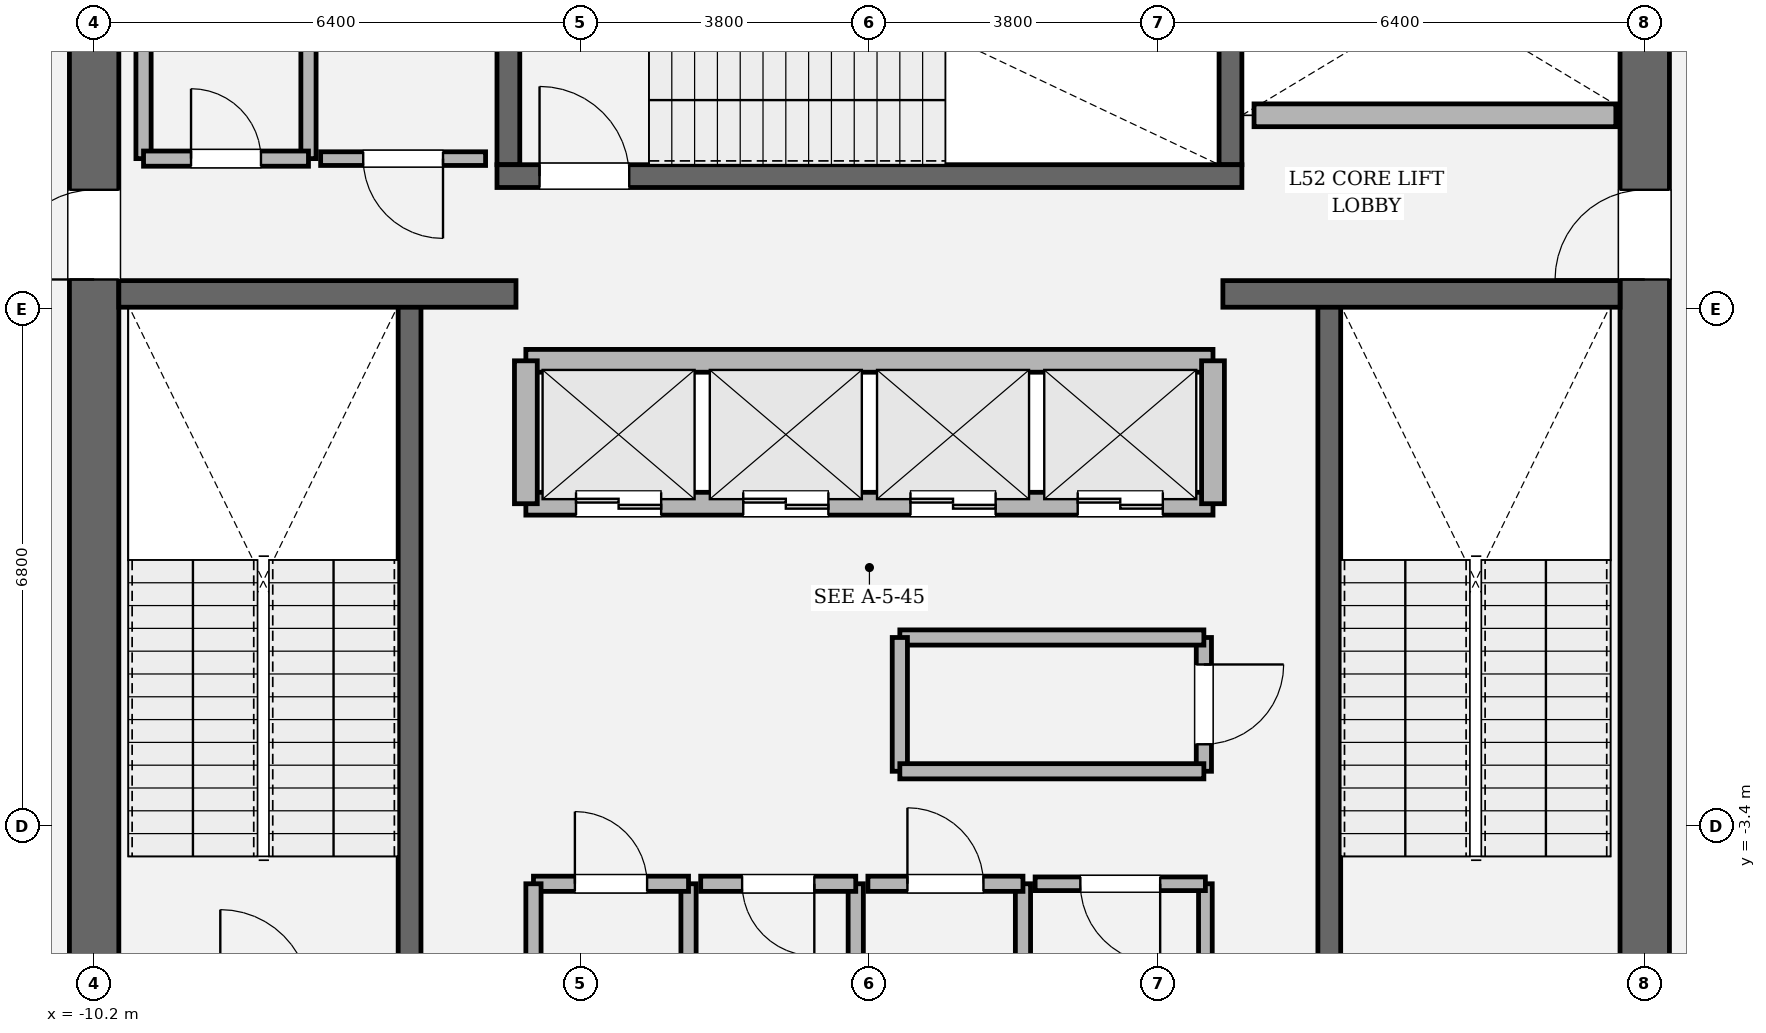
"""IFC4 building model, lengths in metres.
Left out: names, types, materials, properties, quantities, classifications, styles, units other than length and angle.
Written with IfcOpenShell. Run it as: python <this file> out.ifc"""

import sys

from ifc_helpers import new_model, si_unit, direction, frame, frame_2d, origin, place, context, subcontext, project, spatial, rectangle, extrude, element, fill, save


model = new_model("IFC4")
c1 = context("Model", 3, precision=1e-05, world=origin(), true_north=direction((0.0, 1.0)))
c2 = subcontext(c1, "Body", "Model", "MODEL_VIEW")
j1 = project(units=[si_unit("LENGTHUNIT", "METRE"), si_unit("PLANEANGLEUNIT", "RADIAN")], contexts=[c1])
p1 = place(None, origin())
s1 = spatial("IfcSite", under=j1, at=p1, CompositionType="ELEMENT")
p2 = place(p1, origin())
s2 = spatial("IfcBuilding", under=s1, at=p2, CompositionType="ELEMENT")
p3 = place(p2, frame((0.0, 0.0, 220.8)))
s3 = spatial("IfcBuildingStorey", under=s2, at=p3, CompositionType="ELEMENT", Elevation=220.8)
p4 = place(p3, frame((-10.2, -8.875, 0.0), z_axis=(0.0, 0.0, 1.0), x_axis=(0.0, 1.0, 0.0)))
e1 = element("IfcWall", 1, at=p4, inside=s3, PredefinedType="SHEAR", context=c2, shape_type="SweptSolid", body=[
    extrude(rectangle(XDim=17.75, YDim=0.65, at=frame_2d((8.875, 0.0))), origin(), (0.0, 0.0, 1.0), 4.05),
])
p5 = place(p4, frame((12.665, 0.0, 0.0)))
e2 = element("IfcOpeningElement", 2, at=p5, cuts=e1, PredefinedType="OPENING", context=c2, shape_type="SweptSolid", body=[
    extrude(rectangle(XDim=1.18, YDim=2.2, at=frame_2d((0.59, 1.1))), frame((0.0, 0.335, 0.0), z_axis=(0.0, -1.0, 0.0), x_axis=(1.0, 0.0, 0.0)), (0.0, 0.0, 1.0), 0.67),
])
p6 = place(p3, frame((10.2, 8.875, 0.0), z_axis=(0.0, 0.0, 1.0), x_axis=(0.0, -1.0, 0.0)))
e3 = element("IfcWall", 3, at=p6, inside=s3, PredefinedType="SHEAR", context=c2, shape_type="SweptSolid", body=[
    extrude(rectangle(XDim=17.75, YDim=0.65, at=frame_2d((8.875, 0.0))), origin(), (0.0, 0.0, 1.0), 4.05),
])
p7 = place(p6, frame((3.905, 0.0, 0.0)))
e4 = element("IfcOpeningElement", 4, at=p7, cuts=e3, PredefinedType="OPENING", context=c2, shape_type="SweptSolid", body=[
    extrude(rectangle(XDim=1.18, YDim=2.2, at=frame_2d((0.59, 1.1))), frame((0.0, 0.335, 0.0), z_axis=(0.0, -1.0, 0.0), x_axis=(1.0, 0.0, 0.0)), (0.0, 0.0, 1.0), 0.67),
])
for number, where, z_axis, x_axis in (
    (5, (-6.05, -5.5, 0.0), (0.0, 0.0, 1.0), (0.0, 1.0, 0.0)),
    (6, (6.05, 3.45, 0.0), (0.0, 0.0, 1.0), (0.0, -1.0, 0.0)),
):
    element("IfcWall", number, at=place(p3, frame(where, z_axis=z_axis, x_axis=x_axis)), inside=s3, PredefinedType="SOLIDWALL", context=c2, shape_type="SweptSolid", body=[
        extrude(rectangle(XDim=8.95, YDim=0.3, at=frame_2d((4.475, 0.0))), origin(), (0.0, 0.0, 1.0), 4.05),
    ])
for number, where, z_axis, x_axis in (
    (7, (-4.75, 5.3, 0.0), (0.0, 0.0, 1.0), (0.0, 1.0, 0.0)),
    (8, (4.75, 8.875, 0.0), (0.0, 0.0, 1.0), (0.0, -1.0, 0.0)),
):
    element("IfcWall", number, at=place(p3, frame(where, z_axis=z_axis, x_axis=x_axis)), inside=s3, PredefinedType="SOLIDWALL", context=c2, shape_type="SweptSolid", body=[
        extrude(rectangle(XDim=3.575, YDim=0.3, at=frame_2d((1.788, 0.0))), origin(), (0.0, 0.0, 1.0), 4.05),
    ])
p8 = place(p3, frame((-4.9, 5.15, 0.0), z_axis=(0.0, 0.0, 1.0), x_axis=(1.0, 0.0, 0.0)))
e9 = element("IfcWall", 9, at=p8, inside=s3, PredefinedType="SOLIDWALL", context=c2, shape_type="SweptSolid", body=[
    extrude(rectangle(XDim=9.8, YDim=0.3, at=frame_2d((4.9, 0.0))), origin(), (0.0, 0.0, 1.0), 4.05),
])
p9 = place(p8, frame((0.56, 0.0, 0.0)))
e10 = element("IfcOpeningElement", 10, at=p9, cuts=e9, PredefinedType="OPENING", context=c2, shape_type="SweptSolid", body=[
    extrude(rectangle(XDim=1.18, YDim=2.2, at=frame_2d((0.59, 1.1))), frame((0.0, 0.16, 0.0), z_axis=(0.0, -1.0, 0.0), x_axis=(1.0, 0.0, 0.0)), (0.0, 0.0, 1.0), 0.32),
])
for number, where, z_axis, x_axis in (
    (11, (-9.875, 3.6, 0.0), (0.0, 0.0, 1.0), (1.0, 0.0, 0.0)),
    (12, (4.65, 3.6, 0.0), (0.0, 0.0, 1.0), (1.0, 0.0, 0.0)),
):
    element("IfcWall", number, at=place(p3, frame(where, z_axis=z_axis, x_axis=x_axis)), inside=s3, PredefinedType="SOLIDWALL", context=c2, shape_type="SweptSolid", body=[
        extrude(rectangle(XDim=5.225, YDim=0.35, at=frame_2d((2.613, 0.0))), origin(), (0.0, 0.0, 1.0), 4.05),
    ])
p10 = place(p3, frame((-4.52, 0.84, 0.0), z_axis=(0.0, 0.0, 1.0), x_axis=(1.0, 0.0, 0.0)))
e13 = element("IfcWall", 13, at=p10, inside=s3, PredefinedType="SOLIDWALL", context=c2, shape_type="SweptSolid", body=[
    extrude(rectangle(XDim=9.04, YDim=0.3, at=frame_2d((4.52, 0.0))), origin(), (0.0, 0.0, 1.0), 3.83),
])
p11 = place(p10, frame((0.66, 0.0, 0.0)))
e14 = element("IfcOpeningElement", 14, at=p11, cuts=e13, PredefinedType="OPENING", context=c2, shape_type="SweptSolid", body=[
    extrude(rectangle(XDim=1.12, YDim=2.25, at=frame_2d((0.56, 1.125))), frame((0.0, 0.16, 0.0), z_axis=(0.0, -1.0, 0.0), x_axis=(1.0, 0.0, 0.0)), (0.0, 0.0, 1.0), 0.32),
])
p12 = place(p10, frame((2.86, 0.0, 0.0)))
e15 = element("IfcOpeningElement", 15, at=p12, cuts=e13, PredefinedType="OPENING", context=c2, shape_type="SweptSolid", body=[
    extrude(rectangle(XDim=1.12, YDim=2.25, at=frame_2d((0.56, 1.125))), frame((0.0, 0.16, 0.0), z_axis=(0.0, -1.0, 0.0), x_axis=(1.0, 0.0, 0.0)), (0.0, 0.0, 1.0), 0.32),
])
p13 = place(p10, frame((5.06, 0.0, 0.0)))
e16 = element("IfcOpeningElement", 16, at=p13, cuts=e13, PredefinedType="OPENING", context=c2, shape_type="SweptSolid", body=[
    extrude(rectangle(XDim=1.12, YDim=2.25, at=frame_2d((0.56, 1.125))), frame((0.0, 0.16, 0.0), z_axis=(0.0, -1.0, 0.0), x_axis=(1.0, 0.0, 0.0)), (0.0, 0.0, 1.0), 0.32),
])
p14 = place(p10, frame((7.26, 0.0, 0.0)))
e17 = element("IfcOpeningElement", 17, at=p14, cuts=e13, PredefinedType="OPENING", context=c2, shape_type="SweptSolid", body=[
    extrude(rectangle(XDim=1.12, YDim=2.25, at=frame_2d((0.56, 1.125))), frame((0.0, 0.16, 0.0), z_axis=(0.0, -1.0, 0.0), x_axis=(1.0, 0.0, 0.0)), (0.0, 0.0, 1.0), 0.32),
])
p15 = place(p3, frame((-4.52, 2.72, 0.0), z_axis=(0.0, 0.0, 1.0), x_axis=(1.0, 0.0, 0.0)))
e18 = element("IfcWall", 18, at=p15, inside=s3, PredefinedType="SOLIDWALL", context=c2, shape_type="SweptSolid", body=[
    extrude(rectangle(XDim=9.04, YDim=0.3, at=frame_2d((4.52, 0.0))), origin(), (0.0, 0.0, 1.0), 3.83),
])
for number, where, z_axis, x_axis in (
    (19, (-4.52, 0.84, 0.0), (0.0, 0.0, 1.0), (0.0, 1.0, 0.0)),
    (20, (4.52, 0.84, 0.0), (0.0, 0.0, 1.0), (0.0, 1.0, 0.0)),
):
    element("IfcWall", number, at=place(p3, frame(where, z_axis=z_axis, x_axis=x_axis)), inside=s3, PredefinedType="SOLIDWALL", context=c2, shape_type="SweptSolid", body=[
        extrude(rectangle(XDim=1.88, YDim=0.3, at=frame_2d((0.94, 0.0))), origin(), (0.0, 0.0, 1.0), 3.83),
    ])
p16 = place(p3, frame((5.06, 5.95, 0.0), z_axis=(0.0, 0.0, 1.0), x_axis=(1.0, 0.0, 0.0)))
e21 = element("IfcWall", 21, at=p16, inside=s3, PredefinedType="SOLIDWALL", context=c2, shape_type="SweptSolid", body=[
    extrude(rectangle(XDim=4.76, YDim=0.3, at=frame_2d((2.38, 0.0))), origin(), (0.0, 0.0, 1.0), 3.83),
])
p17 = place(p3, frame((-2.38, -5.9, 0.0), z_axis=(0.0, 0.0, 1.0), x_axis=(0.0, 1.0, 0.0)))
e22 = element("IfcWall", 22, at=p17, inside=s3, PredefinedType="SOLIDWALL", context=c2, shape_type="SweptSolid", body=[
    extrude(rectangle(XDim=1.74, YDim=0.2, at=frame_2d((0.87, 0.0))), origin(), (0.0, 0.0, 1.0), 3.83),
])
p18 = place(p3, frame((-2.38, -4.16, 0.0), z_axis=(0.0, 0.0, 1.0), x_axis=(-1.0, 0.0, 0.0)))
e23 = element("IfcWall", 23, at=p18, inside=s3, PredefinedType="SOLIDWALL", context=c2, shape_type="SweptSolid", body=[
    extrude(rectangle(XDim=2.04, YDim=0.2, at=frame_2d((1.02, 0.0))), origin(), (0.0, 0.0, 1.0), 3.83),
])
p19 = place(p18, frame((0.545, 0.0, 0.0)))
e24 = element("IfcOpeningElement", 24, at=p19, cuts=e23, PredefinedType="OPENING", context=c2, shape_type="SweptSolid", body=[
    extrude(rectangle(XDim=0.95, YDim=2.15, at=frame_2d((0.475, 1.075))), frame((0.0, 0.11, 0.0), z_axis=(0.0, -1.0, 0.0), x_axis=(1.0, 0.0, 0.0)), (0.0, 0.0, 1.0), 0.22),
])
for number, where, z_axis, x_axis in (
    (25, (-4.42, -4.16, 0.0), (0.0, 0.0, 1.0), (0.0, -1.0, 0.0)),
    (26, (-0.18, -5.9, 0.0), (0.0, 0.0, 1.0), (0.0, 1.0, 0.0)),
):
    element("IfcWall", number, at=place(p3, frame(where, z_axis=z_axis, x_axis=x_axis)), inside=s3, PredefinedType="SOLIDWALL", context=c2, shape_type="SweptSolid", body=[
        extrude(rectangle(XDim=1.74, YDim=0.2, at=frame_2d((0.87, 0.0))), origin(), (0.0, 0.0, 1.0), 3.83),
    ])
p20 = place(p3, frame((-0.18, -4.16, 0.0), z_axis=(0.0, 0.0, 1.0), x_axis=(-1.0, 0.0, 0.0)))
e27 = element("IfcWall", 27, at=p20, inside=s3, PredefinedType="SOLIDWALL", context=c2, shape_type="SweptSolid", body=[
    extrude(rectangle(XDim=2.04, YDim=0.2, at=frame_2d((1.02, 0.0))), origin(), (0.0, 0.0, 1.0), 3.83),
])
p21 = place(p20, frame((0.545, 0.0, 0.0)))
e28 = element("IfcOpeningElement", 28, at=p21, cuts=e27, PredefinedType="OPENING", context=c2, shape_type="SweptSolid", body=[
    extrude(rectangle(XDim=0.95, YDim=2.15, at=frame_2d((0.475, 1.075))), frame((0.0, 0.11, 0.0), z_axis=(0.0, -1.0, 0.0), x_axis=(1.0, 0.0, 0.0)), (0.0, 0.0, 1.0), 0.22),
])
p22 = place(p3, frame((2.02, -5.9, 0.0), z_axis=(0.0, 0.0, 1.0), x_axis=(0.0, 1.0, 0.0)))
e29 = element("IfcWall", 29, at=p22, inside=s3, PredefinedType="SOLIDWALL", context=c2, shape_type="SweptSolid", body=[
    extrude(rectangle(XDim=1.74, YDim=0.2, at=frame_2d((0.87, 0.0))), origin(), (0.0, 0.0, 1.0), 3.83),
])
p23 = place(p3, frame((2.02, -4.16, 0.0), z_axis=(0.0, 0.0, 1.0), x_axis=(-1.0, 0.0, 0.0)))
e30 = element("IfcWall", 30, at=p23, inside=s3, PredefinedType="SOLIDWALL", context=c2, shape_type="SweptSolid", body=[
    extrude(rectangle(XDim=2.04, YDim=0.2, at=frame_2d((1.02, 0.0))), origin(), (0.0, 0.0, 1.0), 3.83),
])
p24 = place(p23, frame((0.52, 0.0, 0.0)))
e31 = element("IfcOpeningElement", 31, at=p24, cuts=e30, PredefinedType="OPENING", context=c2, shape_type="SweptSolid", body=[
    extrude(rectangle(XDim=1.0, YDim=2.15, at=frame_2d((0.5, 1.075))), frame((0.0, 0.11, 0.0), z_axis=(0.0, -1.0, 0.0), x_axis=(1.0, 0.0, 0.0)), (0.0, 0.0, 1.0), 0.22),
])
p25 = place(p3, frame((4.42, -5.9, 0.0), z_axis=(0.0, 0.0, 1.0), x_axis=(0.0, 1.0, 0.0)))
e32 = element("IfcWall", 32, at=p25, inside=s3, PredefinedType="PARTITIONING", context=c2, shape_type="SweptSolid", body=[
    extrude(rectangle(XDim=1.74, YDim=0.18, at=frame_2d((0.87, 0.0))), origin(), (0.0, 0.0, 1.0), 3.83),
])
p26 = place(p3, frame((4.42, -4.16, 0.0), z_axis=(0.0, 0.0, 1.0), x_axis=(-1.0, 0.0, 0.0)))
e33 = element("IfcWall", 33, at=p26, inside=s3, PredefinedType="PARTITIONING", context=c2, shape_type="SweptSolid", body=[
    extrude(rectangle(XDim=2.24, YDim=0.18, at=frame_2d((1.12, 0.0))), origin(), (0.0, 0.0, 1.0), 3.83),
])
p27 = place(p26, frame((0.595, 0.0, 0.0)))
e34 = element("IfcOpeningElement", 34, at=p27, cuts=e33, PredefinedType="OPENING", context=c2, shape_type="SweptSolid", body=[
    extrude(rectangle(XDim=1.05, YDim=2.2, at=frame_2d((0.525, 1.1))), frame((0.0, 0.1, 0.0), z_axis=(0.0, -1.0, 0.0), x_axis=(1.0, 0.0, 0.0)), (0.0, 0.0, 1.0), 0.2),
])
p28 = place(p3, frame((4.4, -2.68, 0.0), z_axis=(0.0, 0.0, 1.0), x_axis=(0.0, 1.0, 0.0)))
e35 = element("IfcWall", 35, at=p28, inside=s3, PredefinedType="SOLIDWALL", context=c2, shape_type="SweptSolid", body=[
    extrude(rectangle(XDim=1.76, YDim=0.2, at=frame_2d((0.88, 0.0))), origin(), (0.0, 0.0, 1.0), 3.83),
])
p29 = place(p28, frame((0.355, 0.0, 0.0)))
e36 = element("IfcOpeningElement", 36, at=p29, cuts=e35, PredefinedType="OPENING", context=c2, shape_type="SweptSolid", body=[
    extrude(rectangle(XDim=1.05, YDim=2.2, at=frame_2d((0.525, 1.1))), frame((0.0, 0.11, 0.0), z_axis=(0.0, -1.0, 0.0), x_axis=(1.0, 0.0, 0.0)), (0.0, 0.0, 1.0), 0.22),
])
p30 = place(p3, frame((4.4, -0.92, 0.0), z_axis=(0.0, 0.0, 1.0), x_axis=(-1.0, 0.0, 0.0)))
e37 = element("IfcWall", 37, at=p30, inside=s3, PredefinedType="SOLIDWALL", context=c2, shape_type="SweptSolid", body=[
    extrude(rectangle(XDim=4.0, YDim=0.2, at=frame_2d((2.0, 0.0))), origin(), (0.0, 0.0, 1.0), 3.83),
])
p31 = place(p3, frame((0.4, -0.92, 0.0), z_axis=(0.0, 0.0, 1.0), x_axis=(0.0, -1.0, 0.0)))
e38 = element("IfcWall", 38, at=p31, inside=s3, PredefinedType="SOLIDWALL", context=c2, shape_type="SweptSolid", body=[
    extrude(rectangle(XDim=1.76, YDim=0.2, at=frame_2d((0.88, 0.0))), origin(), (0.0, 0.0, 1.0), 3.83),
])
p32 = place(p3, frame((0.4, -2.68, 0.0), z_axis=(0.0, 0.0, 1.0), x_axis=(1.0, 0.0, 0.0)))
e39 = element("IfcWall", 39, at=p32, inside=s3, PredefinedType="SOLIDWALL", context=c2, shape_type="SweptSolid", body=[
    extrude(rectangle(XDim=4.0, YDim=0.2, at=frame_2d((2.0, 0.0))), origin(), (0.0, 0.0, 1.0), 3.83),
])
for number, where, z_axis, x_axis in (
    (40, (-7.38, 5.38, 0.0), (0.0, 0.0, 1.0), (0.0, 1.0, 0.0)),
    (41, (-9.55, 8.65, 0.0), (0.0, 0.0, 1.0), (0.0, -1.0, 0.0)),
):
    element("IfcWall", number, at=place(p3, frame(where, z_axis=z_axis, x_axis=x_axis)), inside=s3, PredefinedType="SOLIDWALL", context=c2, shape_type="SweptSolid", body=[
        extrude(rectangle(XDim=3.27, YDim=0.2, at=frame_2d((1.635, 0.0))), origin(), (0.0, 0.0, 1.0), 3.83),
    ])
p33 = place(p3, frame((-9.55, 5.38, 0.0), z_axis=(0.0, 0.0, 1.0), x_axis=(1.0, 0.0, 0.0)))
e42 = element("IfcWall", 42, at=p33, inside=s3, PredefinedType="SOLIDWALL", context=c2, shape_type="SweptSolid", body=[
    extrude(rectangle(XDim=2.17, YDim=0.2, at=frame_2d((1.085, 0.0))), origin(), (0.0, 0.0, 1.0), 3.83),
])
p34 = place(p33, frame((0.625, 0.0, 0.0)))
e43 = element("IfcOpeningElement", 43, at=p34, cuts=e42, PredefinedType="OPENING", context=c2, shape_type="SweptSolid", body=[
    extrude(rectangle(XDim=0.92, YDim=2.1, at=frame_2d((0.46, 1.05))), frame((0.0, 0.11, 0.0), z_axis=(0.0, -1.0, 0.0), x_axis=(1.0, 0.0, 0.0)), (0.0, 0.0, 1.0), 0.22),
])
p35 = place(p3, frame((-7.22, 5.38, 0.0), z_axis=(0.0, 0.0, 1.0), x_axis=(1.0, 0.0, 0.0)))
e44 = element("IfcWall", 44, at=p35, inside=s3, PredefinedType="PARTITIONING", context=c2, shape_type="SweptSolid", body=[
    extrude(rectangle(XDim=2.17, YDim=0.18, at=frame_2d((1.085, 0.0))), origin(), (0.0, 0.0, 1.0), 3.83),
])
p36 = place(p35, frame((0.56, 0.0, 0.0)))
e45 = element("IfcOpeningElement", 45, at=p36, cuts=e44, PredefinedType="OPENING", context=c2, shape_type="SweptSolid", body=[
    extrude(rectangle(XDim=1.05, YDim=2.2, at=frame_2d((0.525, 1.1))), frame((0.0, 0.1, 0.0), z_axis=(0.0, -1.0, 0.0), x_axis=(1.0, 0.0, 0.0)), (0.0, 0.0, 1.0), 0.2),
])
p37 = place(p9, origin())
e46 = element("IfcDoor", 46, at=p37, inside=s3, OperationType="SINGLE_SWING_LEFT", PredefinedType="DOOR", context=c2, shape_type="SweptSolid", body=[
    extrude(rectangle(XDim=1.18, YDim=2.2, at=frame_2d((0.59, 1.1))), frame((0.0, 0.025, 0.0), z_axis=(0.0, -1.0, 0.0), x_axis=(1.0, 0.0, 0.0)), (0.0, 0.0, 1.0), 0.05),
])
fill(e10, e46)
p38 = place(p5, origin())
e47 = element("IfcDoor", 47, at=p38, inside=s3, OperationType="SINGLE_SWING_LEFT", PredefinedType="DOOR", context=c2, shape_type="SweptSolid", body=[
    extrude(rectangle(XDim=1.18, YDim=2.2, at=frame_2d((0.59, 1.1))), frame((0.0, 0.025, 0.0), z_axis=(0.0, -1.0, 0.0), x_axis=(1.0, 0.0, 0.0)), (0.0, 0.0, 1.0), 0.05),
])
fill(e2, e47)
p39 = place(p7, origin())
e48 = element("IfcDoor", 48, at=p39, inside=s3, OperationType="SINGLE_SWING_RIGHT", PredefinedType="DOOR", context=c2, shape_type="SweptSolid", body=[
    extrude(rectangle(XDim=1.18, YDim=2.2, at=frame_2d((0.59, 1.1))), frame((0.0, 0.025, 0.0), z_axis=(0.0, -1.0, 0.0), x_axis=(1.0, 0.0, 0.0)), (0.0, 0.0, 1.0), 0.05),
])
fill(e4, e48)
p40 = place(p11, origin())
e49 = element("IfcDoor", 49, at=p40, inside=s3, OperationType="DOUBLE_DOOR_SLIDING", PredefinedType="DOOR", context=c2, shape_type="SweptSolid", body=[
    extrude(rectangle(XDim=1.12, YDim=2.25, at=frame_2d((0.56, 1.125))), frame((0.0, 0.025, 0.0), z_axis=(0.0, -1.0, 0.0), x_axis=(1.0, 0.0, 0.0)), (0.0, 0.0, 1.0), 0.05),
])
fill(e14, e49)
p41 = place(p12, origin())
e50 = element("IfcDoor", 50, at=p41, inside=s3, OperationType="DOUBLE_DOOR_SLIDING", PredefinedType="DOOR", context=c2, shape_type="SweptSolid", body=[
    extrude(rectangle(XDim=1.12, YDim=2.25, at=frame_2d((0.56, 1.125))), frame((0.0, 0.025, 0.0), z_axis=(0.0, -1.0, 0.0), x_axis=(1.0, 0.0, 0.0)), (0.0, 0.0, 1.0), 0.05),
])
fill(e15, e50)
p42 = place(p13, origin())
e51 = element("IfcDoor", 51, at=p42, inside=s3, OperationType="DOUBLE_DOOR_SLIDING", PredefinedType="DOOR", context=c2, shape_type="SweptSolid", body=[
    extrude(rectangle(XDim=1.12, YDim=2.25, at=frame_2d((0.56, 1.125))), frame((0.0, 0.025, 0.0), z_axis=(0.0, -1.0, 0.0), x_axis=(1.0, 0.0, 0.0)), (0.0, 0.0, 1.0), 0.05),
])
fill(e16, e51)
p43 = place(p14, origin())
e52 = element("IfcDoor", 52, at=p43, inside=s3, OperationType="DOUBLE_DOOR_SLIDING", PredefinedType="DOOR", context=c2, shape_type="SweptSolid", body=[
    extrude(rectangle(XDim=1.12, YDim=2.25, at=frame_2d((0.56, 1.125))), frame((0.0, 0.025, 0.0), z_axis=(0.0, -1.0, 0.0), x_axis=(1.0, 0.0, 0.0)), (0.0, 0.0, 1.0), 0.05),
])
fill(e17, e52)
p44 = place(p19, origin())
e53 = element("IfcDoor", 53, at=p44, inside=s3, OperationType="SINGLE_SWING_RIGHT", PredefinedType="DOOR", context=c2, shape_type="SweptSolid", body=[
    extrude(rectangle(XDim=0.95, YDim=2.15, at=frame_2d((0.475, 1.075))), frame((0.0, 0.025, 0.0), z_axis=(0.0, -1.0, 0.0), x_axis=(1.0, 0.0, 0.0)), (0.0, 0.0, 1.0), 0.05),
])
fill(e24, e53)
p45 = place(p21, origin())
e54 = element("IfcDoor", 54, at=p45, inside=s3, OperationType="SINGLE_SWING_LEFT", PredefinedType="DOOR", context=c2, shape_type="SweptSolid", body=[
    extrude(rectangle(XDim=0.95, YDim=2.15, at=frame_2d((0.475, 1.075))), frame((0.0, 0.025, 0.0), z_axis=(0.0, -1.0, 0.0), x_axis=(1.0, 0.0, 0.0)), (0.0, 0.0, 1.0), 0.05),
])
fill(e28, e54)
p46 = place(p24, origin())
e55 = element("IfcDoor", 55, at=p46, inside=s3, OperationType="SINGLE_SWING_RIGHT", PredefinedType="DOOR", context=c2, shape_type="SweptSolid", body=[
    extrude(rectangle(XDim=1.0, YDim=2.15, at=frame_2d((0.5, 1.075))), frame((0.0, 0.025, 0.0), z_axis=(0.0, -1.0, 0.0), x_axis=(1.0, 0.0, 0.0)), (0.0, 0.0, 1.0), 0.05),
])
fill(e31, e55)
p47 = place(p27, origin())
e56 = element("IfcDoor", 56, at=p47, inside=s3, OperationType="SINGLE_SWING_LEFT", PredefinedType="DOOR", context=c2, shape_type="SweptSolid", body=[
    extrude(rectangle(XDim=1.05, YDim=2.2, at=frame_2d((0.525, 1.1))), frame((0.0, 0.025, 0.0), z_axis=(0.0, -1.0, 0.0), x_axis=(1.0, 0.0, 0.0)), (0.0, 0.0, 1.0), 0.05),
])
fill(e34, e56)
p48 = place(p29, origin())
e57 = element("IfcDoor", 57, at=p48, inside=s3, OperationType="SINGLE_SWING_RIGHT", PredefinedType="DOOR", context=c2, shape_type="SweptSolid", body=[
    extrude(rectangle(XDim=1.05, YDim=2.2, at=frame_2d((0.525, 1.1))), frame((0.0, 0.025, 0.0), z_axis=(0.0, -1.0, 0.0), x_axis=(1.0, 0.0, 0.0)), (0.0, 0.0, 1.0), 0.05),
])
fill(e36, e57)
p49 = place(p34, origin())
e58 = element("IfcDoor", 58, at=p49, inside=s3, OperationType="SINGLE_SWING_LEFT", PredefinedType="DOOR", context=c2, shape_type="SweptSolid", body=[
    extrude(rectangle(XDim=0.92, YDim=2.1, at=frame_2d((0.46, 1.05))), frame((0.0, 0.025, 0.0), z_axis=(0.0, -1.0, 0.0), x_axis=(1.0, 0.0, 0.0)), (0.0, 0.0, 1.0), 0.05),
])
fill(e43, e58)
p50 = place(p36, origin())
e59 = element("IfcDoor", 59, at=p50, inside=s3, OperationType="SINGLE_SWING_RIGHT", PredefinedType="DOOR", context=c2, shape_type="SweptSolid", body=[
    extrude(rectangle(XDim=1.05, YDim=2.2, at=frame_2d((0.525, 1.1))), frame((0.0, 0.025, 0.0), z_axis=(0.0, -1.0, 0.0), x_axis=(1.0, 0.0, 0.0)), (0.0, 0.0, 1.0), 0.05),
])
fill(e45, e59)
save(model, sys.argv[1])
